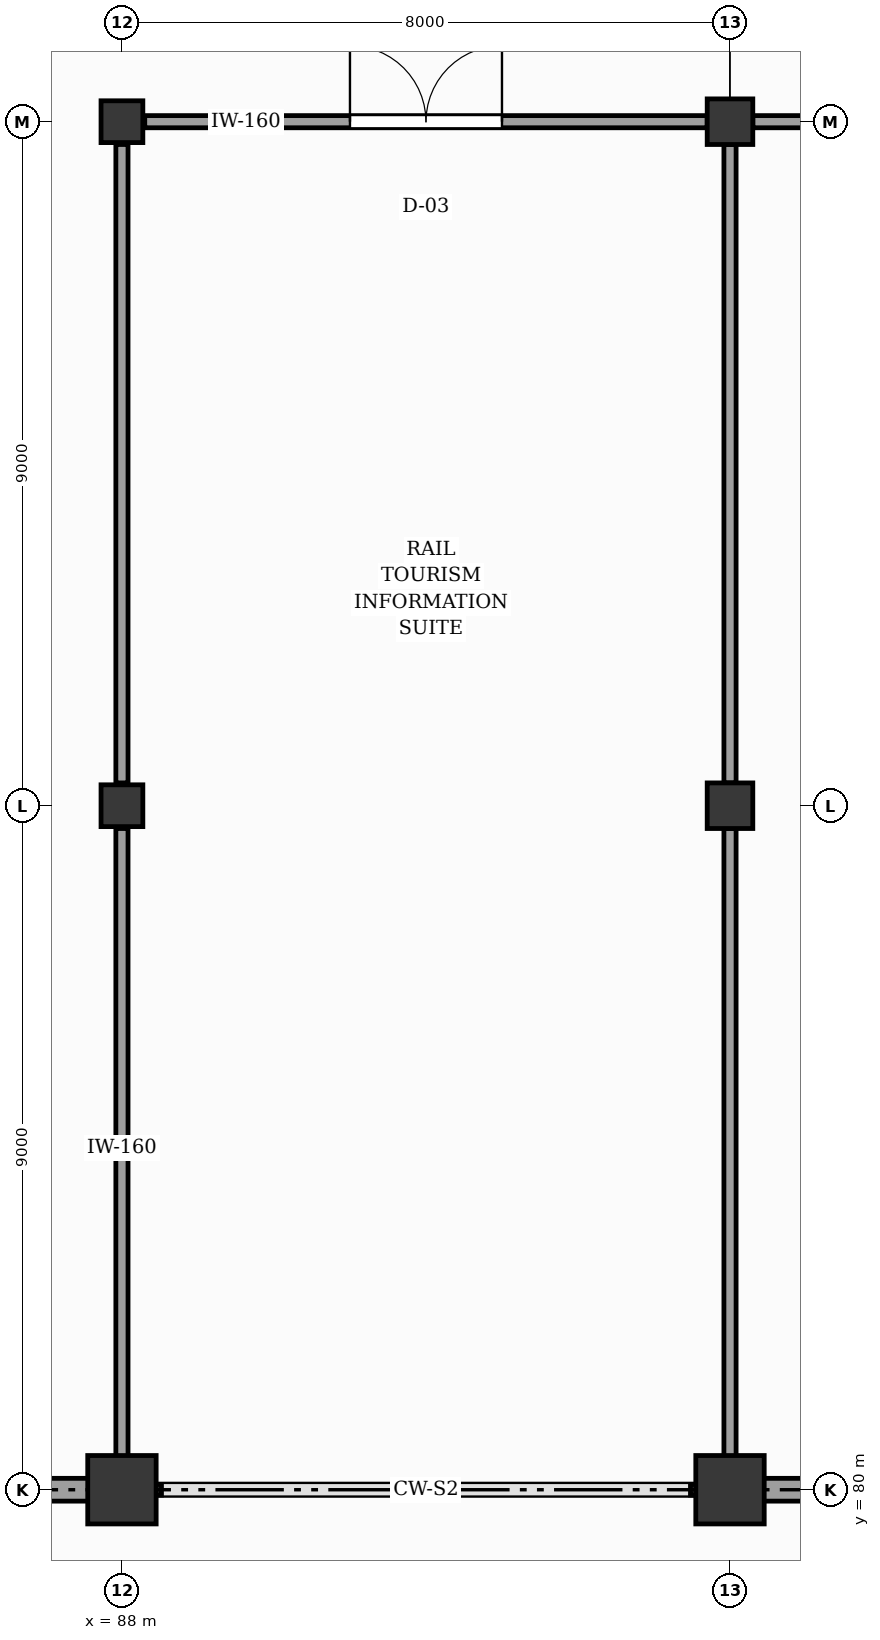
"""IFC4 building model, lengths in metres.
Left out: names, types, materials, properties, quantities, classifications, styles, units other than length and angle.
Written with IfcOpenShell. Run it as: python <this file> out.ifc"""

import sys

from ifc_helpers import new_model, si_unit, direction, frame, frame_2d, origin, origin_2d, place, context, subcontext, project, spatial, rectangle, extrude, element, fill, save


model = new_model("IFC4")
c1 = context("Model", 3, precision=1e-05, world=origin(), true_north=direction((0.0, 1.0)))
c2 = subcontext(c1, "Body", "Model", "MODEL_VIEW")
j1 = project(units=[si_unit("LENGTHUNIT", "METRE"), si_unit("PLANEANGLEUNIT", "RADIAN")], contexts=[c1])
p1 = place(None, origin())
s1 = spatial("IfcSite", under=j1, at=p1, CompositionType="ELEMENT")
p2 = place(p1, origin())
s2 = spatial("IfcBuilding", under=s1, at=p2, CompositionType="ELEMENT")
p3 = place(p2, frame((0.0, 0.0, 9.6)))
s3 = spatial("IfcBuildingStorey", under=s2, at=p3, CompositionType="ELEMENT", Elevation=9.6)
p4 = place(p3, frame((88.0, 80.0, 0.0), z_axis=(0.0, 0.0, 1.0), x_axis=(1.0, 0.0, 0.0)))
e1 = element("IfcColumn", 1, at=p4, inside=s3, PredefinedType="COLUMN", context=c2, shape_type="SweptSolid", body=[
    extrude(rectangle(XDim=0.9, YDim=0.9, at=origin_2d()), origin(), (0.0, 0.0, 1.0), 6.6),
])
for number, where, z_axis, x_axis in (
    (2, (88.0, 89.0, 0.0), (0.0, 0.0, 1.0), (1.0, 0.0, 0.0)),
    (3, (88.0, 98.0, 0.0), (0.0, 0.0, 1.0), (1.0, 0.0, 0.0)),
):
    element("IfcColumn", number, at=place(p3, frame(where, z_axis=z_axis, x_axis=x_axis)), inside=s3, PredefinedType="COLUMN", context=c2, shape_type="SweptSolid", body=[
        extrude(rectangle(XDim=0.55, YDim=0.55, at=origin_2d()), origin(), (0.0, 0.0, 1.0), 6.6),
    ])
p5 = place(p3, frame((96.0, 80.0, 0.0), z_axis=(0.0, 0.0, 1.0), x_axis=(1.0, 0.0, 0.0)))
e4 = element("IfcColumn", 4, at=p5, inside=s3, PredefinedType="COLUMN", context=c2, shape_type="SweptSolid", body=[
    extrude(rectangle(XDim=0.9, YDim=0.9, at=origin_2d()), origin(), (0.0, 0.0, 1.0), 6.6),
])
for number, where, z_axis, x_axis in (
    (5, (96.0, 89.0, 0.0), (0.0, 0.0, 1.0), (1.0, 0.0, 0.0)),
    (6, (96.0, 98.0, 0.0), (0.0, 0.0, 1.0), (1.0, 0.0, 0.0)),
):
    element("IfcColumn", number, at=place(p3, frame(where, z_axis=z_axis, x_axis=x_axis)), inside=s3, PredefinedType="COLUMN", context=c2, shape_type="SweptSolid", body=[
        extrude(rectangle(XDim=0.6, YDim=0.6, at=origin_2d()), origin(), (0.0, 0.0, 1.0), 6.6),
    ])
p6 = place(p3, frame((80.345, 80.0, 0.0), z_axis=(0.0, 0.0, 1.0), x_axis=(1.0, 0.0, 0.0)))
e7 = element("IfcWall", 7, at=p6, inside=s3, PredefinedType="SOLIDWALL", context=c2, shape_type="SweptSolid", body=[
    extrude(rectangle(XDim=7.31, YDim=0.3, at=frame_2d((3.655, 0.0))), origin(), (0.0, 0.0, 1.0), 3.22),
])
p7 = place(p6, frame((2.455, 0.0, 0.0)))
e8 = element("IfcOpeningElement", 8, at=p7, cuts=e7, PredefinedType="OPENING", context=c2, shape_type="SweptSolid", body=[
    extrude(rectangle(XDim=2.4, YDim=2.35, at=frame_2d((1.2, 1.175))), frame((0.0, 0.16, 0.0), z_axis=(0.0, -1.0, 0.0), x_axis=(1.0, 0.0, 0.0)), (0.0, 0.0, 1.0), 0.32),
])
p8 = place(p3, frame((96.345, 80.0, 0.0), z_axis=(0.0, 0.0, 1.0), x_axis=(1.0, 0.0, 0.0)))
e9 = element("IfcWall", 9, at=p8, inside=s3, PredefinedType="SOLIDWALL", context=c2, shape_type="SweptSolid", body=[
    extrude(rectangle(XDim=7.31, YDim=0.3, at=frame_2d((3.655, 0.0))), origin(), (0.0, 0.0, 1.0), 4.12),
])
p9 = place(p8, frame((2.455, 0.0, 0.0)))
e10 = element("IfcOpeningElement", 10, at=p9, cuts=e9, PredefinedType="OPENING", context=c2, shape_type="SweptSolid", body=[
    extrude(rectangle(XDim=2.4, YDim=2.35, at=frame_2d((1.2, 1.175))), frame((0.0, 0.16, 0.0), z_axis=(0.0, -1.0, 0.0), x_axis=(1.0, 0.0, 0.0)), (0.0, 0.0, 1.0), 0.32),
])
p10 = place(p3, frame((88.3, 98.0, 0.0), z_axis=(0.0, 0.0, 1.0), x_axis=(1.0, 0.0, 0.0)))
e11 = element("IfcWall", 11, at=p10, inside=s3, PredefinedType="PARTITIONING", context=c2, shape_type="SweptSolid", body=[
    extrude(rectangle(XDim=7.4, YDim=0.16, at=frame_2d((3.7, 0.0))), origin(), (0.0, 0.0, 1.0), 5.5),
])
p11 = place(p10, frame((2.7, 0.0, 0.0)))
e12 = element("IfcOpeningElement", 12, at=p11, cuts=e11, PredefinedType="OPENING", context=c2, shape_type="SweptSolid", body=[
    extrude(rectangle(XDim=2.0, YDim=2.3, at=frame_2d((1.0, 1.15))), frame((0.0, 0.09, 0.0), z_axis=(0.0, -1.0, 0.0), x_axis=(1.0, 0.0, 0.0)), (0.0, 0.0, 1.0), 0.18),
])
p12 = place(p3, frame((88.0, 80.3, 0.0), z_axis=(0.0, 0.0, 1.0), x_axis=(0.0, 1.0, 0.0)))
e13 = element("IfcWall", 13, at=p12, inside=s3, PredefinedType="PARTITIONING", context=c2, shape_type="SweptSolid", body=[
    extrude(rectangle(XDim=8.4, YDim=0.16, at=frame_2d((4.2, 0.0))), origin(), (0.0, 0.0, 1.0), 5.36),
])
p13 = place(p3, frame((88.0, 89.3, 0.0), z_axis=(0.0, 0.0, 1.0), x_axis=(0.0, 1.0, 0.0)))
e14 = element("IfcWall", 14, at=p13, inside=s3, PredefinedType="PARTITIONING", context=c2, shape_type="SweptSolid", body=[
    extrude(rectangle(XDim=8.4, YDim=0.16, at=frame_2d((4.2, 0.0))), origin(), (0.0, 0.0, 1.0), 5.5),
])
p14 = place(p3, frame((96.0, 80.3, 0.0), z_axis=(0.0, 0.0, 1.0), x_axis=(0.0, 1.0, 0.0)))
e15 = element("IfcWall", 15, at=p14, inside=s3, PredefinedType="PARTITIONING", context=c2, shape_type="SweptSolid", body=[
    extrude(rectangle(XDim=8.4, YDim=0.16, at=frame_2d((4.2, 0.0))), origin(), (0.0, 0.0, 1.0), 5.36),
])
p15 = place(p3, frame((96.0, 89.3, 0.0), z_axis=(0.0, 0.0, 1.0), x_axis=(0.0, 1.0, 0.0)))
e16 = element("IfcWall", 16, at=p15, inside=s3, PredefinedType="PARTITIONING", context=c2, shape_type="SweptSolid", body=[
    extrude(rectangle(XDim=8.4, YDim=0.16, at=frame_2d((4.2, 0.0))), origin(), (0.0, 0.0, 1.0), 5.5),
])
p16 = place(p3, frame((96.3, 98.0, 0.0), z_axis=(0.0, 0.0, 1.0), x_axis=(1.0, 0.0, 0.0)))
e17 = element("IfcWall", 17, at=p16, inside=s3, PredefinedType="PARTITIONING", context=c2, shape_type="SweptSolid", body=[
    extrude(rectangle(XDim=7.4, YDim=0.16, at=frame_2d((3.7, 0.0))), origin(), (0.0, 0.0, 1.0), 5.5),
])
p17 = place(p16, frame((2.8, 0.0, 0.0)))
e18 = element("IfcOpeningElement", 18, at=p17, cuts=e17, PredefinedType="OPENING", context=c2, shape_type="SweptSolid", body=[
    extrude(rectangle(XDim=1.8, YDim=2.25, at=frame_2d((0.9, 1.125))), frame((0.0, 0.09, 0.0), z_axis=(0.0, -1.0, 0.0), x_axis=(1.0, 0.0, 0.0)), (0.0, 0.0, 1.0), 0.18),
])
p18 = place(p11, origin())
e19 = element("IfcDoor", 19, at=p18, inside=s3, OperationType="DOUBLE_DOOR_SINGLE_SWING", PredefinedType="DOOR", context=c2, shape_type="SweptSolid", body=[
    extrude(rectangle(XDim=2.0, YDim=2.3, at=frame_2d((1.0, 1.15))), frame((0.0, 0.025, 0.0), z_axis=(0.0, -1.0, 0.0), x_axis=(1.0, 0.0, 0.0)), (0.0, 0.0, 1.0), 0.05),
])
fill(e12, e19)
save(model, sys.argv[1])
